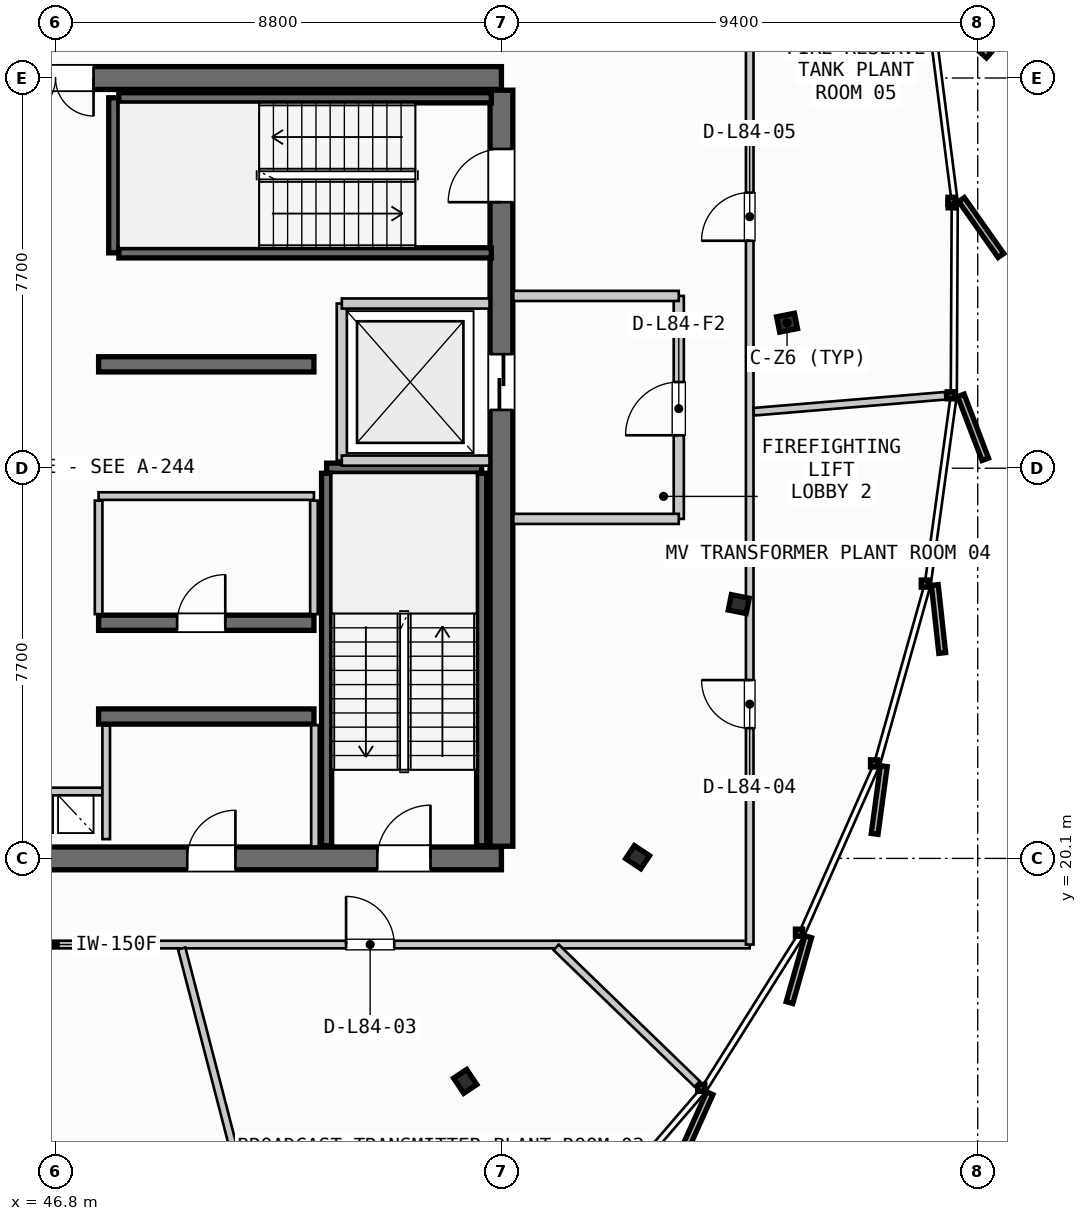
"""IFC4 building model, lengths in metres.
Left out: names, types, materials, properties, quantities, classifications, styles, units other than length and angle.
Written with IfcOpenShell. Run it as: python <this file> out.ifc"""

import sys

from ifc_helpers import new_model, si_unit, direction, frame, frame_2d, origin, origin_2d, place, context, subcontext, project, spatial, rectangle, i_section, extrude, source, transform, mapped, element, fill, save


model = new_model("IFC4")
c1 = context("Model", 3, precision=1e-05, world=origin(), true_north=direction((0.0, 1.0)))
c2 = subcontext(c1, "Body", "Model", "MODEL_VIEW")
j1 = project(units=[si_unit("LENGTHUNIT", "METRE"), si_unit("PLANEANGLEUNIT", "RADIAN")], contexts=[c1])
p1 = place(None, origin())
s1 = spatial("IfcSite", under=j1, at=p1, CompositionType="ELEMENT")
p2 = place(p1, origin())
s2 = spatial("IfcBuilding", under=s1, at=p2, CompositionType="ELEMENT")
p3 = place(p2, frame((0.0, 0.0, 316.3)))
s3 = spatial("IfcBuildingStorey", under=s2, at=p3, CompositionType="ELEMENT", Elevation=316.3)
p4 = place(p3, frame((38.0, 20.1, 0.0), z_axis=(0.0, 0.0, 1.0), x_axis=(1.0, 0.0, 0.0)))
e1 = element("IfcWall", 1, at=p4, inside=s3, PredefinedType="SHEAR", context=c2, shape_type="SweptSolid", body=[
    extrude(rectangle(XDim=17.6, YDim=0.45, at=frame_2d((8.8, 0.0))), origin(), (0.0, 0.0, 1.0), 3.735),
])
p5 = place(p4, frame((1.4, 0.0, 0.0)))
e2 = element("IfcOpeningElement", 2, at=p5, cuts=e1, PredefinedType="OPENING", context=c2, shape_type="SweptSolid", body=[
    extrude(rectangle(XDim=1.05, YDim=2.15, at=frame_2d((0.525, 1.075))), frame((0.0, 0.235, 0.0), z_axis=(0.0, -1.0, 0.0), x_axis=(1.0, 0.0, 0.0)), (0.0, 0.0, 1.0), 0.47),
])
p6 = place(p4, frame((15.15, 0.0, 0.0)))
e3 = element("IfcOpeningElement", 3, at=p6, cuts=e1, PredefinedType="OPENING", context=c2, shape_type="SweptSolid", body=[
    extrude(rectangle(XDim=1.05, YDim=2.15, at=frame_2d((0.525, 1.075))), frame((0.0, 0.235, 0.0), z_axis=(0.0, -1.0, 0.0), x_axis=(1.0, 0.0, 0.0)), (0.0, 0.0, 1.0), 0.47),
])
p7 = place(p4, frame((5.25, 0.0, 0.0)))
e4 = element("IfcOpeningElement", 4, at=p7, cuts=e1, PredefinedType="OPENING", context=c2, shape_type="SweptSolid", body=[
    extrude(rectangle(XDim=0.95, YDim=2.15, at=frame_2d((0.475, 1.075))), frame((0.0, 0.235, 0.0), z_axis=(0.0, -1.0, 0.0), x_axis=(1.0, 0.0, 0.0)), (0.0, 0.0, 1.0), 0.47),
])
p8 = place(p4, frame((11.4, 0.0, 0.0)))
e5 = element("IfcOpeningElement", 5, at=p8, cuts=e1, PredefinedType="OPENING", context=c2, shape_type="SweptSolid", body=[
    extrude(rectangle(XDim=0.95, YDim=2.15, at=frame_2d((0.475, 1.075))), frame((0.0, 0.235, 0.0), z_axis=(0.0, -1.0, 0.0), x_axis=(1.0, 0.0, 0.0)), (0.0, 0.0, 1.0), 0.47),
])
p9 = place(p3, frame((55.6, 35.5, 0.0), z_axis=(0.0, 0.0, 1.0), x_axis=(-1.0, 0.0, 0.0)))
e6 = element("IfcWall", 6, at=p9, inside=s3, PredefinedType="SHEAR", context=c2, shape_type="SweptSolid", body=[
    extrude(rectangle(XDim=17.6, YDim=0.45, at=frame_2d((8.8, 0.0))), origin(), (0.0, 0.0, 1.0), 3.735),
])
p10 = place(p9, frame((8.05, 0.0, 0.0)))
e7 = element("IfcOpeningElement", 7, at=p10, cuts=e6, PredefinedType="OPENING", context=c2, shape_type="SweptSolid", body=[
    extrude(rectangle(XDim=1.5, YDim=2.2, at=frame_2d((0.75, 1.1))), frame((0.0, 0.235, 0.0), z_axis=(0.0, -1.0, 0.0), x_axis=(1.0, 0.0, 0.0)), (0.0, 0.0, 1.0), 0.47),
])
p11 = place(p9, frame((15.85, 0.0, 0.0)))
e8 = element("IfcOpeningElement", 8, at=p11, cuts=e6, PredefinedType="OPENING", context=c2, shape_type="SweptSolid", body=[
    extrude(rectangle(XDim=0.85, YDim=2.15, at=frame_2d((0.425, 1.075))), frame((0.0, 0.235, 0.0), z_axis=(0.0, -1.0, 0.0), x_axis=(1.0, 0.0, 0.0)), (0.0, 0.0, 1.0), 0.47),
])
p12 = place(p9, frame((14.35, 0.0, 0.0)))
e9 = element("IfcOpeningElement", 9, at=p12, cuts=e6, PredefinedType="OPENING", context=c2, shape_type="SweptSolid", body=[
    extrude(rectangle(XDim=0.85, YDim=2.15, at=frame_2d((0.425, 1.075))), frame((0.0, 0.235, 0.0), z_axis=(0.0, -1.0, 0.0), x_axis=(1.0, 0.0, 0.0)), (0.0, 0.0, 1.0), 0.47),
])
p13 = place(p9, frame((12.3, 0.0, 0.0)))
e10 = element("IfcOpeningElement", 10, at=p13, cuts=e6, PredefinedType="OPENING", context=c2, shape_type="SweptSolid", body=[
    extrude(rectangle(XDim=0.95, YDim=2.15, at=frame_2d((0.475, 1.075))), frame((0.0, 0.235, 0.0), z_axis=(0.0, -1.0, 0.0), x_axis=(1.0, 0.0, 0.0)), (0.0, 0.0, 1.0), 0.47),
])
p14 = place(p9, frame((10.2, 0.0, 0.0)))
e11 = element("IfcOpeningElement", 11, at=p14, cuts=e6, PredefinedType="OPENING", context=c2, shape_type="SweptSolid", body=[
    extrude(rectangle(XDim=0.9, YDim=2.15, at=frame_2d((0.45, 1.075))), frame((0.0, 0.235, 0.0), z_axis=(0.0, -1.0, 0.0), x_axis=(1.0, 0.0, 0.0)), (0.0, 0.0, 1.0), 0.47),
])
p15 = place(p3, frame((55.6, 20.34, 0.0), z_axis=(0.0, 0.0, 1.0), x_axis=(0.0, 1.0, 0.0)))
e12 = element("IfcWall", 12, at=p15, inside=s3, PredefinedType="SHEAR", context=c2, shape_type="SweptSolid", body=[
    extrude(rectangle(XDim=14.92, YDim=0.45, at=frame_2d((7.46, 0.0))), origin(), (0.0, 0.0, 1.0), 3.735),
])
p16 = place(p15, frame((12.71, 0.0, 0.0)))
e13 = element("IfcOpeningElement", 13, at=p16, cuts=e12, PredefinedType="OPENING", context=c2, shape_type="SweptSolid", body=[
    extrude(rectangle(XDim=1.05, YDim=2.15, at=frame_2d((0.525, 1.075))), frame((0.0, 0.235, 0.0), z_axis=(0.0, -1.0, 0.0), x_axis=(1.0, 0.0, 0.0)), (0.0, 0.0, 1.0), 0.47),
])
p17 = place(p15, frame((8.61, 0.0, 0.0)))
e14 = element("IfcOpeningElement", 14, at=p17, cuts=e12, PredefinedType="OPENING", context=c2, shape_type="SweptSolid", body=[
    extrude(rectangle(XDim=1.1, YDim=2.2, at=frame_2d((0.55, 1.1))), frame((0.0, 0.235, 0.0), z_axis=(0.0, -1.0, 0.0), x_axis=(1.0, 0.0, 0.0)), (0.0, 0.0, 1.0), 0.47),
])
p18 = place(p3, frame((47.65, 22.9, 0.0), z_axis=(0.0, 0.0, 1.0), x_axis=(1.0, 0.0, 0.0)))
e15 = element("IfcWall", 15, at=p18, inside=s3, PredefinedType="SHEAR", context=c2, shape_type="SweptSolid", body=[
    extrude(rectangle(XDim=4.25, YDim=0.3, at=frame_2d((2.125, 0.0))), origin(), (0.0, 0.0, 1.0), 3.735),
])
p19 = place(p3, frame((47.65, 24.75, 0.0), z_axis=(0.0, 0.0, 1.0), x_axis=(1.0, 0.0, 0.0)))
e16 = element("IfcWall", 16, at=p19, inside=s3, PredefinedType="SHEAR", context=c2, shape_type="SweptSolid", body=[
    extrude(rectangle(XDim=4.25, YDim=0.3, at=frame_2d((2.125, 0.0))), origin(), (0.0, 0.0, 1.0), 3.735),
])
p20 = place(p19, frame((1.55, 0.0, 0.0)))
e17 = element("IfcOpeningElement", 17, at=p20, cuts=e16, PredefinedType="OPENING", context=c2, shape_type="SweptSolid", body=[
    extrude(rectangle(XDim=0.95, YDim=2.15, at=frame_2d((0.475, 1.075))), frame((0.0, 0.16, 0.0), z_axis=(0.0, -1.0, 0.0), x_axis=(1.0, 0.0, 0.0)), (0.0, 0.0, 1.0), 0.32),
])
p21 = place(p3, frame((47.65, 29.85, 0.0), z_axis=(0.0, 0.0, 1.0), x_axis=(1.0, 0.0, 0.0)))
e18 = element("IfcWall", 18, at=p21, inside=s3, PredefinedType="SHEAR", context=c2, shape_type="SweptSolid", body=[
    extrude(rectangle(XDim=4.25, YDim=0.3, at=frame_2d((2.125, 0.0))), origin(), (0.0, 0.0, 1.0), 3.735),
])
m1 = source(origin(), c2, "Body", "SweptSolid", [
    extrude(i_section(OverallWidth=0.309, OverallDepth=0.359, WebThickness=0.016, FlangeThickness=0.026, FilletRadius=0.027, at=origin_2d()), origin(), (0.0, 0.0, 1.0), 3.735),
])
for number, where, z_axis, x_axis in (
    (19, (61.237, 30.672, 0.0), (0.0, 0.0, 1.0), (0.981, 0.195, 0.0)),
    (20, (54.885, 15.7, 0.0), (0.0, 0.0, 1.0), (0.556, -0.831, 0.0)),
    (21, (58.287, 20.125, 0.0), (0.0, 0.0, 1.0), (0.831, -0.556, 0.0)),
    (22, (60.284, 25.118, 0.0), (0.0, 0.0, 1.0), (0.981, -0.195, 0.0)),
):
    element("IfcColumn", number, at=place(p3, frame(where, z_axis=z_axis, x_axis=x_axis)), inside=s3, PredefinedType="COLUMN", context=c2, shape_type="MappedRepresentation", body=[
        mapped(m1, transform((0.0, 0.0, 0.0), scale=1.0)),
    ])
p22 = place(p3, frame((52.15, 27.8, 0.0), z_axis=(0.0, 0.0, 1.0), x_axis=(1.0, 0.0, 0.0)))
e23 = element("IfcWall", 23, at=p22, inside=s3, PredefinedType="SHEAR", context=c2, shape_type="SweptSolid", body=[
    extrude(rectangle(XDim=3.06, YDim=0.2, at=frame_2d((1.53, 0.0))), origin(), (0.0, 0.0, 1.0), 3.735),
])
for number, where, z_axis, x_axis in (
    (24, (55.21, 27.7, 0.0), (0.0, 0.0, 1.0), (0.0, -1.0, 0.0)),
    (25, (52.15, 20.35, 0.0), (0.0, 0.0, 1.0), (0.0, 1.0, 0.0)),
):
    element("IfcWall", number, at=place(p3, frame(where, z_axis=z_axis, x_axis=x_axis)), inside=s3, PredefinedType="SHEAR", context=c2, shape_type="SweptSolid", body=[
        extrude(rectangle(XDim=7.35, YDim=0.2, at=frame_2d((3.675, 0.0))), origin(), (0.0, 0.0, 1.0), 3.735),
    ])
p23 = place(p3, frame((47.95, 32.05, 0.0), z_axis=(0.0, 0.0, 1.0), x_axis=(0.0, 1.0, 0.0)))
e26 = element("IfcWall", 26, at=p23, inside=s3, PredefinedType="SHEAR", context=c2, shape_type="SweptSolid", body=[
    extrude(rectangle(XDim=3.06, YDim=0.2, at=frame_2d((1.53, 0.0))), origin(), (0.0, 0.0, 1.0), 3.735),
])
for number, where, z_axis, x_axis in (
    (27, (48.05, 35.11, 0.0), (0.0, 0.0, 1.0), (1.0, 0.0, 0.0)),
    (28, (55.4, 32.05, 0.0), (0.0, 0.0, 1.0), (-1.0, 0.0, 0.0)),
):
    element("IfcWall", number, at=place(p3, frame(where, z_axis=z_axis, x_axis=x_axis)), inside=s3, PredefinedType="SHEAR", context=c2, shape_type="SweptSolid", body=[
        extrude(rectangle(XDim=7.35, YDim=0.2, at=frame_2d((3.675, 0.0))), origin(), (0.0, 0.0, 1.0), 3.735),
    ])
p24 = place(p3, frame((45.8, 21.42, 0.0), z_axis=(0.0, 0.0, 1.0), x_axis=(1.0, 0.0, 0.0)))
e29 = element("IfcWall", 29, at=p24, inside=s3, PredefinedType="PARTITIONING", context=c2, shape_type="SweptSolid", body=[
    extrude(rectangle(XDim=2.0, YDim=0.15, at=frame_2d((1.0, 0.0))), origin(), (0.0, 0.0, 1.0), 3.26),
])
p25 = place(p3, frame((47.8, 20.48, 0.0), z_axis=(0.0, 0.0, 1.0), x_axis=(0.0, 1.0, 0.0)))
e30 = element("IfcWall", 30, at=p25, inside=s3, PredefinedType="PARTITIONING", context=c2, shape_type="SweptSolid", body=[
    extrude(rectangle(XDim=2.24, YDim=0.15, at=frame_2d((1.12, 0.0))), origin(), (0.0, 0.0, 1.0), 3.26),
])
p26 = place(p3, frame((52.45, 27.95, 0.0), z_axis=(0.0, 0.0, 1.0), x_axis=(0.0, 1.0, 0.0)))
e31 = element("IfcWall", 31, at=p26, inside=s3, PredefinedType="PARTITIONING", context=c2, shape_type="SweptSolid", body=[
    extrude(rectangle(XDim=3.1, YDim=0.2, at=frame_2d((1.55, 0.0))), origin(), (0.0, 0.0, 1.0), 3.26),
])
for number, where, z_axis, x_axis in (
    (32, (52.45, 27.95, 0.0), (0.0, 0.0, 1.0), (1.0, 0.0, 0.0)),
    (33, (52.45, 31.05, 0.0), (0.0, 0.0, 1.0), (1.0, 0.0, 0.0)),
):
    element("IfcWall", number, at=place(p3, frame(where, z_axis=z_axis, x_axis=x_axis)), inside=s3, PredefinedType="PARTITIONING", context=c2, shape_type="SweptSolid", body=[
        extrude(rectangle(XDim=2.915, YDim=0.2, at=frame_2d((1.458, 0.0))), origin(), (0.0, 0.0, 1.0), 3.26),
    ])
p27 = place(p3, frame((59.1, 26.8, 0.0), z_axis=(0.0, 0.0, 1.0), x_axis=(0.0, 1.0, 0.0)))
e34 = element("IfcWall", 34, at=p27, inside=s3, PredefinedType="PARTITIONING", context=c2, shape_type="SweptSolid", body=[
    extrude(rectangle(XDim=4.4, YDim=0.2, at=frame_2d((2.2, 0.0))), origin(), (0.0, 0.0, 1.0), 3.26),
])
p28 = place(p27, frame((1.65, 0.0, 0.0)))
e35 = element("IfcOpeningElement", 35, at=p28, cuts=e34, PredefinedType="OPENING", context=c2, shape_type="SweptSolid", body=[
    extrude(rectangle(XDim=1.05, YDim=2.15, at=frame_2d((0.525, 1.075))), frame((0.0, 0.11, 0.0), z_axis=(0.0, -1.0, 0.0), x_axis=(1.0, 0.0, 0.0)), (0.0, 0.0, 1.0), 0.22),
])
for number, where, z_axis, x_axis in (
    (36, (55.835, 26.8, 0.0), (0.0, 0.0, 1.0), (1.0, 0.0, 0.0)),
    (37, (55.835, 31.2, 0.0), (0.0, 0.0, 1.0), (1.0, 0.0, 0.0)),
):
    element("IfcWall", number, at=place(p3, frame(where, z_axis=z_axis, x_axis=x_axis)), inside=s3, PredefinedType="PARTITIONING", context=c2, shape_type="SweptSolid", body=[
        extrude(rectangle(XDim=3.265, YDim=0.2, at=frame_2d((1.633, 0.0))), origin(), (0.0, 0.0, 1.0), 3.26),
    ])
p29 = place(p3, frame((51.92, 20.335, 0.0), z_axis=(0.0, 0.0, 1.0), x_axis=(0.0, 1.0, 0.0)))
e38 = element("IfcWall", 38, at=p29, inside=s3, PredefinedType="PARTITIONING", context=c2, shape_type="SweptSolid", body=[
    extrude(rectangle(XDim=2.395, YDim=0.15, at=frame_2d((1.198, 0.0))), origin(), (0.0, 0.0, 1.0), 3.26),
])
p30 = place(p3, frame((47.65, 27.25, 0.0), z_axis=(0.0, 0.0, 1.0), x_axis=(1.0, 0.0, 0.0)))
e39 = element("IfcWall", 39, at=p30, inside=s3, PredefinedType="PARTITIONING", context=c2, shape_type="SweptSolid", body=[
    extrude(rectangle(XDim=4.25, YDim=0.15, at=frame_2d((2.125, 0.0))), origin(), (0.0, 0.0, 1.0), 3.26),
])
for number, where, z_axis, x_axis in (
    (40, (47.65, 24.92, 0.0), (0.0, 0.0, 1.0), (0.0, 1.0, 0.0)),
    (41, (51.9, 24.92, 0.0), (0.0, 0.0, 1.0), (0.0, 1.0, 0.0)),
):
    element("IfcWall", number, at=place(p3, frame(where, z_axis=z_axis, x_axis=x_axis)), inside=s3, PredefinedType="PARTITIONING", context=c2, shape_type="SweptSolid", body=[
        extrude(rectangle(XDim=2.24, YDim=0.15, at=frame_2d((1.12, 0.0))), origin(), (0.0, 0.0, 1.0), 3.26),
    ])
p31 = place(p3, frame((33.1, 18.4, 0.0), z_axis=(0.0, 0.0, 1.0), x_axis=(1.0, 0.0, 0.0)))
e42 = element("IfcWall", 42, at=p31, inside=s3, PredefinedType="PARTITIONING", context=c2, shape_type="SweptSolid", body=[
    extrude(rectangle(XDim=27.4, YDim=0.15, at=frame_2d((13.7, 0.0))), origin(), (0.0, 0.0, 1.0), 3.26),
])
p32 = place(p31, frame((4.163, 0.0, 0.0)))
e43 = element("IfcOpeningElement", 43, at=p32, cuts=e42, PredefinedType="OPENING", context=c2, shape_type="SweptSolid", body=[
    extrude(rectangle(XDim=0.95, YDim=2.15, at=frame_2d((0.475, 1.075))), frame((0.0, 0.085, 0.0), z_axis=(0.0, -1.0, 0.0), x_axis=(1.0, 0.0, 0.0)), (0.0, 0.0, 1.0), 0.17),
])
p33 = place(p31, frame((11.945, 0.0, 0.0)))
e44 = element("IfcOpeningElement", 44, at=p33, cuts=e42, PredefinedType="OPENING", context=c2, shape_type="SweptSolid", body=[
    extrude(rectangle(XDim=0.95, YDim=2.15, at=frame_2d((0.475, 1.075))), frame((0.0, 0.085, 0.0), z_axis=(0.0, -1.0, 0.0), x_axis=(1.0, 0.0, 0.0)), (0.0, 0.0, 1.0), 0.17),
])
p34 = place(p31, frame((19.434, 0.0, 0.0)))
e45 = element("IfcOpeningElement", 45, at=p34, cuts=e42, PredefinedType="OPENING", context=c2, shape_type="SweptSolid", body=[
    extrude(rectangle(XDim=0.95, YDim=2.15, at=frame_2d((0.475, 1.075))), frame((0.0, 0.085, 0.0), z_axis=(0.0, -1.0, 0.0), x_axis=(1.0, 0.0, 0.0)), (0.0, 0.0, 1.0), 0.17),
])
p35 = place(p3, frame((60.5, 18.4, 0.0), z_axis=(0.0, 0.0, 1.0), x_axis=(0.0, 1.0, 0.0)))
e46 = element("IfcWall", 46, at=p35, inside=s3, PredefinedType="PARTITIONING", context=c2, shape_type="SweptSolid", body=[
    extrude(rectangle(XDim=18.8, YDim=0.15, at=frame_2d((9.4, 0.0))), origin(), (0.0, 0.0, 1.0), 3.26),
])
p36 = place(p35, frame((4.269, 0.0, 0.0)))
e47 = element("IfcOpeningElement", 47, at=p36, cuts=e46, PredefinedType="OPENING", context=c2, shape_type="SweptSolid", body=[
    extrude(rectangle(XDim=0.95, YDim=2.15, at=frame_2d((0.475, 1.075))), frame((0.0, 0.085, 0.0), z_axis=(0.0, -1.0, 0.0), x_axis=(1.0, 0.0, 0.0)), (0.0, 0.0, 1.0), 0.17),
])
p37 = place(p35, frame((13.889, 0.0, 0.0)))
e48 = element("IfcOpeningElement", 48, at=p37, cuts=e46, PredefinedType="OPENING", context=c2, shape_type="SweptSolid", body=[
    extrude(rectangle(XDim=0.95, YDim=2.15, at=frame_2d((0.475, 1.075))), frame((0.0, 0.085, 0.0), z_axis=(0.0, -1.0, 0.0), x_axis=(1.0, 0.0, 0.0)), (0.0, 0.0, 1.0), 0.17),
])
p38 = place(p3, frame((49.29, 18.323, 0.0), z_axis=(0.0, 0.0, 1.0), x_axis=(0.250860534884, -0.96802323941, 0.0)))
e49 = element("IfcWall", 49, at=p38, inside=s3, PredefinedType="PARTITIONING", context=c2, shape_type="SweptSolid", body=[
    extrude(rectangle(XDim=9.588, YDim=0.15, at=frame_2d((4.794, 0.0))), origin(), (0.0, 0.0, 1.0), 3.26),
])
p39 = place(p3, frame((56.68, 18.344, 0.0), z_axis=(0.0, 0.0, 1.0), x_axis=(0.718355321418, -0.695676384672, 0.0)))
e50 = element("IfcWall", 50, at=p39, inside=s3, PredefinedType="PARTITIONING", context=c2, shape_type="SweptSolid", body=[
    extrude(rectangle(XDim=3.875, YDim=0.15, at=frame_2d((1.938, 0.0))), origin(), (0.0, 0.0, 1.0), 3.26),
])
p40 = place(p3, frame((60.58, 28.914, 0.0), z_axis=(0.0, 0.0, 1.0), x_axis=(0.996539539042, 0.083120076554, 0.0)))
e51 = element("IfcWall", 51, at=p40, inside=s3, PredefinedType="PARTITIONING", context=c2, shape_type="SweptSolid", body=[
    extrude(rectangle(XDim=3.792, YDim=0.15, at=frame_2d((1.896, 0.0))), origin(), (0.0, 0.0, 1.0), 3.26),
])
m2 = source(origin(), c2, "Body", "SweptSolid", [
    extrude(rectangle(XDim=1.05, YDim=2.15, at=frame_2d((0.525, 1.075))), frame((0.0, 0.025, 0.0), z_axis=(0.0, -1.0, 0.0), x_axis=(1.0, 0.0, 0.0)), (0.0, 0.0, 1.0), 0.05),
])
p41 = place(p6, origin())
e52 = element("IfcDoor", 52, at=p41, inside=s3, OperationType="SINGLE_SWING_RIGHT", PredefinedType="DOOR", context=c2, shape_type="MappedRepresentation", body=[
    mapped(m2, transform((0.0, 0.0, 0.0), scale=1.0)),
])
fill(e3, e52)
p42 = place(p16, origin())
e53 = element("IfcDoor", 53, at=p42, inside=s3, OperationType="SINGLE_SWING_LEFT", PredefinedType="DOOR", context=c2, shape_type="MappedRepresentation", body=[
    mapped(m2, transform((0.0, 0.0, 0.0), scale=1.0)),
])
fill(e13, e53)
m3 = source(origin(), c2, "Body", "SweptSolid", [
    extrude(rectangle(XDim=1.5, YDim=2.2, at=frame_2d((0.75, 1.1))), frame((0.0, 0.025, 0.0), z_axis=(0.0, -1.0, 0.0), x_axis=(1.0, 0.0, 0.0)), (0.0, 0.0, 1.0), 0.05),
])
p43 = place(p10, origin())
e54 = element("IfcDoor", 54, at=p43, inside=s3, OperationType="DOUBLE_DOOR_SINGLE_SWING", PredefinedType="DOOR", context=c2, shape_type="MappedRepresentation", body=[
    mapped(m3, transform((0.0, 0.0, 0.0), scale=1.0)),
])
fill(e7, e54)
m4 = source(origin(), c2, "Body", "SweptSolid", [
    extrude(rectangle(XDim=1.1, YDim=2.2, at=frame_2d((0.55, 1.1))), frame((0.0, 0.025, 0.0), z_axis=(0.0, -1.0, 0.0), x_axis=(1.0, 0.0, 0.0)), (0.0, 0.0, 1.0), 0.05),
])
p44 = place(p17, origin())
e55 = element("IfcDoor", 55, at=p44, inside=s3, OperationType="SLIDING_TO_RIGHT", PredefinedType="DOOR", context=c2, shape_type="MappedRepresentation", body=[
    mapped(m4, transform((0.0, 0.0, 0.0), scale=1.0)),
])
fill(e14, e55)
m5 = source(origin(), c2, "Body", "SweptSolid", [
    extrude(rectangle(XDim=0.95, YDim=2.15, at=frame_2d((0.475, 1.075))), frame((0.0, 0.025, 0.0), z_axis=(0.0, -1.0, 0.0), x_axis=(1.0, 0.0, 0.0)), (0.0, 0.0, 1.0), 0.05),
])
p45 = place(p8, origin())
e56 = element("IfcDoor", 56, at=p45, inside=s3, OperationType="SINGLE_SWING_RIGHT", PredefinedType="DOOR", context=c2, shape_type="MappedRepresentation", body=[
    mapped(m5, transform((0.0, 0.0, 0.0), scale=1.0)),
])
fill(e5, e56)
p46 = place(p20, origin())
e57 = element("IfcDoor", 57, at=p46, inside=s3, OperationType="SINGLE_SWING_RIGHT", PredefinedType="DOOR", context=c2, shape_type="MappedRepresentation", body=[
    mapped(m5, transform((0.0, 0.0, 0.0), scale=1.0)),
])
fill(e17, e57)
p47 = place(p28, origin())
e58 = element("IfcDoor", 58, at=p47, inside=s3, OperationType="SINGLE_SWING_LEFT", PredefinedType="DOOR", context=c2, shape_type="MappedRepresentation", body=[
    mapped(m2, transform((0.0, 0.0, 0.0), scale=1.0)),
])
fill(e35, e58)
p48 = place(p34, origin())
e59 = element("IfcDoor", 59, at=p48, inside=s3, OperationType="SINGLE_SWING_LEFT", PredefinedType="DOOR", context=c2, shape_type="MappedRepresentation", body=[
    mapped(m5, transform((0.0, 0.0, 0.0), scale=1.0)),
])
fill(e45, e59)
p49 = place(p36, origin())
e60 = element("IfcDoor", 60, at=p49, inside=s3, OperationType="SINGLE_SWING_RIGHT", PredefinedType="DOOR", context=c2, shape_type="MappedRepresentation", body=[
    mapped(m5, transform((0.0, 0.0, 0.0), scale=1.0)),
])
fill(e47, e60)
p50 = place(p37, origin())
e61 = element("IfcDoor", 61, at=p50, inside=s3, OperationType="SINGLE_SWING_LEFT", PredefinedType="DOOR", context=c2, shape_type="MappedRepresentation", body=[
    mapped(m5, transform((0.0, 0.0, 0.0), scale=1.0)),
])
fill(e48, e61)
save(model, sys.argv[1])
